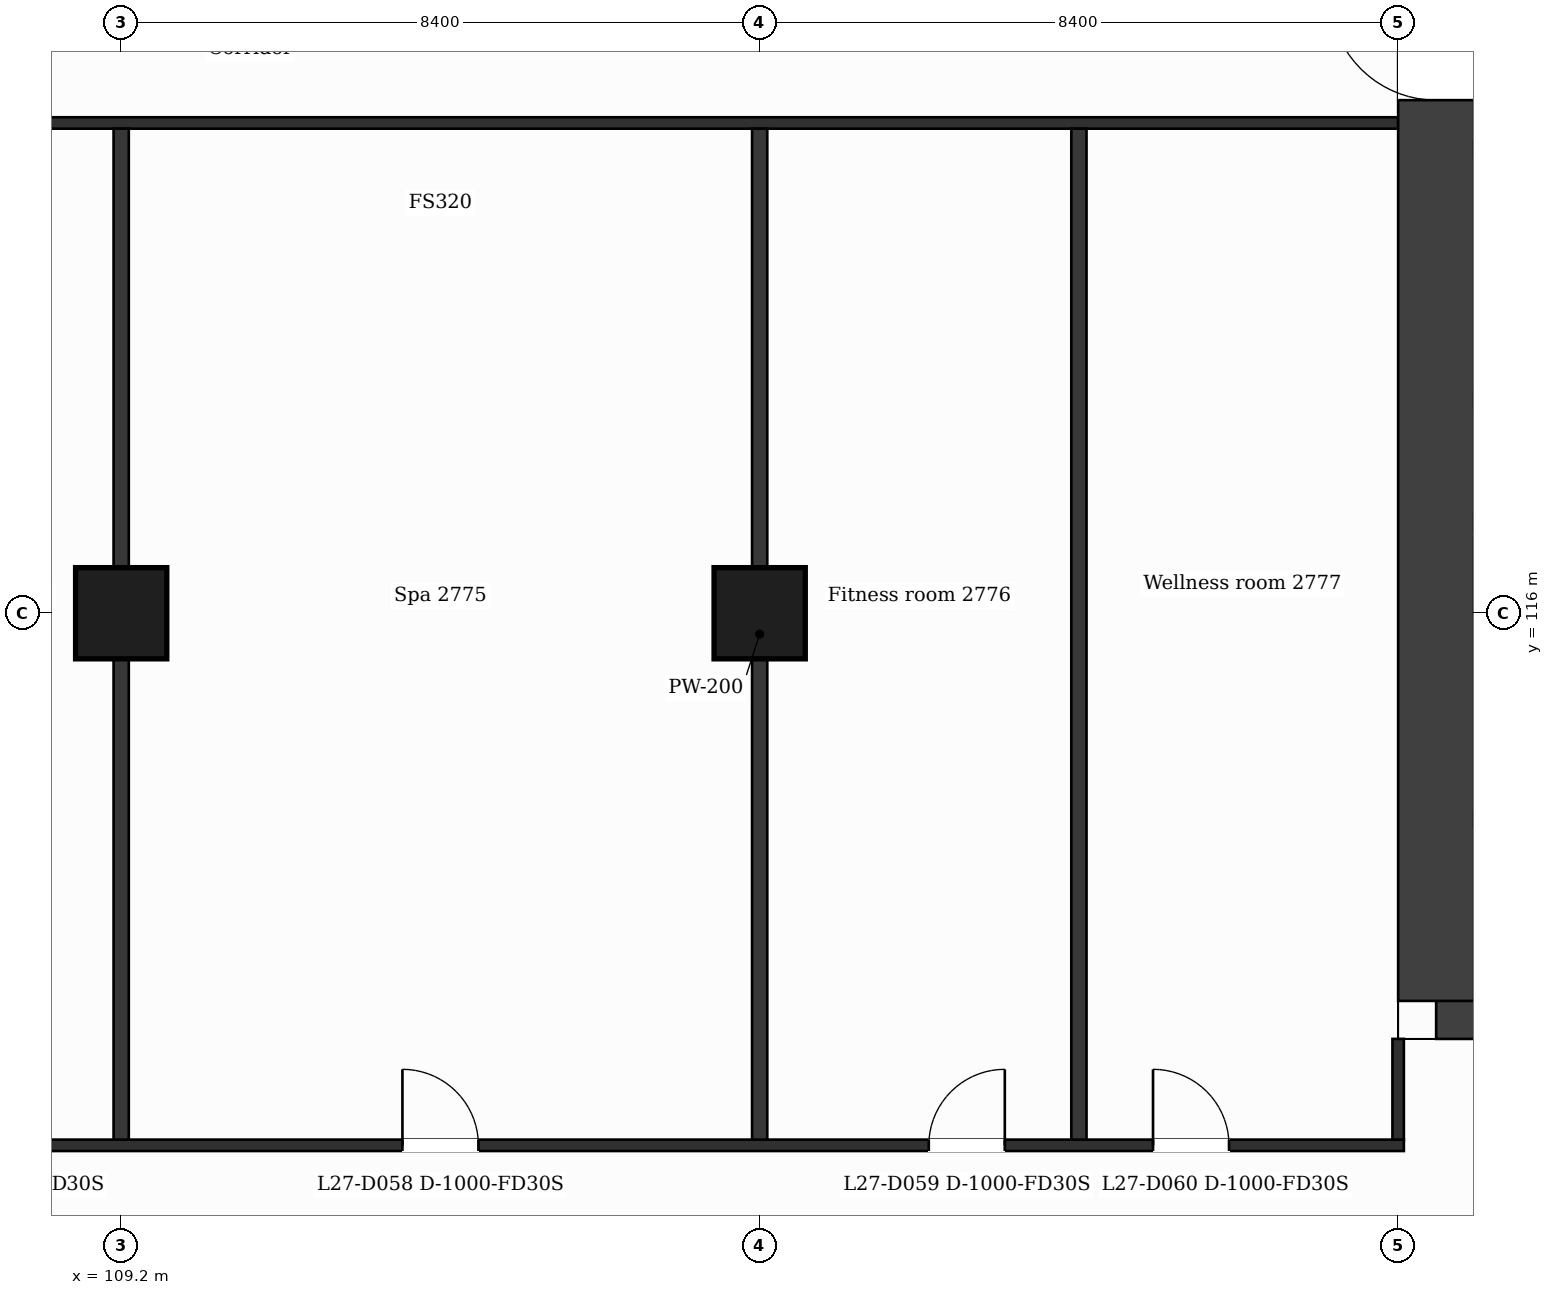
"""IFC4 building model, lengths in metres.
Left out: names, types, materials, properties, quantities, classifications, styles, units other than length and angle.
Written with IfcOpenShell. Run it as: python <this file> out.ifc"""

import sys

from ifc_helpers import new_model, si_unit, direction, frame, frame_2d, origin, origin_2d, place, context, subcontext, project, spatial, rectangle, extrude, element, fill, save


model = new_model("IFC4")
c1 = context("Model", 3, precision=1e-05, world=origin(), true_north=direction((0.0, 1.0)))
c2 = subcontext(c1, "Body", "Model", "MODEL_VIEW")
j1 = project(units=[si_unit("LENGTHUNIT", "METRE"), si_unit("PLANEANGLEUNIT", "RADIAN")], contexts=[c1])
p1 = place(None, origin())
s1 = spatial("IfcSite", under=j1, at=p1, CompositionType="ELEMENT")
p2 = place(p1, origin())
s2 = spatial("IfcBuilding", under=s1, at=p2, CompositionType="ELEMENT")
p3 = place(p2, frame((0.0, 0.0, 116.9)))
s3 = spatial("IfcBuildingStorey", under=s2, at=p3, CompositionType="ELEMENT", Elevation=116.9)
p4 = place(p3, frame((140.559, 110.9, 0.0), z_axis=(0.0, 0.0, 1.0), x_axis=(-1.0, 0.0, 0.0)))
e1 = element("IfcWall", 1, at=p4, inside=s3, PredefinedType="SHEAR", context=c2, shape_type="SweptSolid", body=[
    extrude(rectangle(XDim=14.059, YDim=1.0, at=frame_2d((7.029, 0.0))), origin(), (0.0, 0.0, 1.0), 3.7),
])
p5 = place(p4, frame((6.858, 0.0, 0.0)))
e2 = element("IfcOpeningElement", 2, at=p5, cuts=e1, PredefinedType="OPENING", context=c2, shape_type="SweptSolid", body=[
    extrude(rectangle(XDim=1.4, YDim=2.1, at=frame_2d((0.7, 1.05))), frame((0.0, 0.51, 0.0), z_axis=(0.0, -1.0, 0.0), x_axis=(1.0, 0.0, 0.0)), (0.0, 0.0, 1.0), 1.02),
])
p6 = place(p3, frame((126.5, 110.9, 0.0), z_axis=(0.0, 0.0, 1.0), x_axis=(0.0, 1.0, 0.0)))
e3 = element("IfcWall", 3, at=p6, inside=s3, PredefinedType="SHEAR", context=c2, shape_type="SweptSolid", body=[
    extrude(rectangle(XDim=21.0, YDim=1.0, at=frame_2d((10.5, 0.0))), origin(), (0.0, 0.0, 1.0), 3.7),
])
p7 = place(p6, frame((11.85, 0.0, 0.0)))
e4 = element("IfcOpeningElement", 4, at=p7, cuts=e3, PredefinedType="OPENING", context=c2, shape_type="SweptSolid", body=[
    extrude(rectangle(XDim=1.4, YDim=2.1, at=frame_2d((0.7, 1.05))), frame((0.0, 0.51, 0.0), z_axis=(0.0, -1.0, 0.0), x_axis=(1.0, 0.0, 0.0)), (0.0, 0.0, 1.0), 1.02),
])
for number, where, z_axis, x_axis in (
    (5, (109.2, 116.0, 0.0), (0.0, 0.0, 1.0), (1.0, 0.0, 0.0)),
    (6, (117.6, 116.0, 0.0), (0.0, 0.0, 1.0), (1.0, 0.0, 0.0)),
):
    element("IfcColumn", number, at=place(p3, frame(where, z_axis=z_axis, x_axis=x_axis)), inside=s3, PredefinedType="COLUMN", context=c2, shape_type="SweptSolid", body=[
        extrude(rectangle(XDim=1.2, YDim=1.2, at=origin_2d()), origin(), (0.0, 0.0, 1.0), 3.7),
    ])
p8 = place(p3, frame((100.725, 109.0, 0.0), z_axis=(0.0, 0.0, 1.0), x_axis=(1.0, 0.0, 0.0)))
e7 = element("IfcWall", 7, at=p8, inside=s3, PredefinedType="PARTITIONING", context=c2, shape_type="SweptSolid", body=[
    extrude(rectangle(XDim=25.35, YDim=0.15, at=frame_2d((12.675, 0.0))), origin(), (0.0, 0.0, 1.0), 3.38),
])
p9 = place(p8, frame((1.925, 0.0, 0.0)))
e8 = element("IfcOpeningElement", 8, at=p9, cuts=e7, PredefinedType="OPENING", context=c2, shape_type="SweptSolid", body=[
    extrude(rectangle(XDim=1.0, YDim=2.1, at=frame_2d((0.5, 1.05))), frame((0.0, 0.085, 0.0), z_axis=(0.0, -1.0, 0.0), x_axis=(1.0, 0.0, 0.0)), (0.0, 0.0, 1.0), 0.17),
])
p10 = place(p8, frame((6.125, 0.0, 0.0)))
e9 = element("IfcOpeningElement", 9, at=p10, cuts=e7, PredefinedType="OPENING", context=c2, shape_type="SweptSolid", body=[
    extrude(rectangle(XDim=1.0, YDim=2.1, at=frame_2d((0.5, 1.05))), frame((0.0, 0.085, 0.0), z_axis=(0.0, -1.0, 0.0), x_axis=(1.0, 0.0, 0.0)), (0.0, 0.0, 1.0), 0.17),
])
p11 = place(p8, frame((12.175, 0.0, 0.0)))
e10 = element("IfcOpeningElement", 10, at=p11, cuts=e7, PredefinedType="OPENING", context=c2, shape_type="SweptSolid", body=[
    extrude(rectangle(XDim=1.0, YDim=2.1, at=frame_2d((0.5, 1.05))), frame((0.0, 0.085, 0.0), z_axis=(0.0, -1.0, 0.0), x_axis=(1.0, 0.0, 0.0)), (0.0, 0.0, 1.0), 0.17),
])
p12 = place(p8, frame((19.1, 0.0, 0.0)))
e11 = element("IfcOpeningElement", 11, at=p12, cuts=e7, PredefinedType="OPENING", context=c2, shape_type="SweptSolid", body=[
    extrude(rectangle(XDim=1.0, YDim=2.1, at=frame_2d((0.5, 1.05))), frame((0.0, 0.085, 0.0), z_axis=(0.0, -1.0, 0.0), x_axis=(1.0, 0.0, 0.0)), (0.0, 0.0, 1.0), 0.17),
])
p13 = place(p8, frame((22.05, 0.0, 0.0)))
e12 = element("IfcOpeningElement", 12, at=p13, cuts=e7, PredefinedType="OPENING", context=c2, shape_type="SweptSolid", body=[
    extrude(rectangle(XDim=1.0, YDim=2.1, at=frame_2d((0.5, 1.05))), frame((0.0, 0.085, 0.0), z_axis=(0.0, -1.0, 0.0), x_axis=(1.0, 0.0, 0.0)), (0.0, 0.0, 1.0), 0.17),
])
p14 = place(p3, frame((127.0, 113.3, 0.0), z_axis=(0.0, 0.0, 1.0), x_axis=(1.0, 0.0, 0.0)))
e13 = element("IfcWall", 13, at=p14, inside=s3, PredefinedType="PARTITIONING", context=c2, shape_type="SweptSolid", body=[
    extrude(rectangle(XDim=4.673, YDim=0.2, at=frame_2d((2.336, 0.0))), origin(), (0.0, 0.0, 1.0), 3.38),
])
p15 = place(p14, frame((0.715, 0.0, 0.0)))
e14 = element("IfcOpeningElement", 14, at=p15, cuts=e13, PredefinedType="OPENING", context=c2, shape_type="SweptSolid", body=[
    extrude(rectangle(XDim=1.1, YDim=2.1, at=frame_2d((0.55, 1.05))), frame((0.0, 0.11, 0.0), z_axis=(0.0, -1.0, 0.0), x_axis=(1.0, 0.0, 0.0)), (0.0, 0.0, 1.0), 0.22),
])
p16 = place(p3, frame((100.8, 122.45, 0.0), z_axis=(0.0, 0.0, 1.0), x_axis=(1.0, 0.0, 0.0)))
e15 = element("IfcWall", 15, at=p16, inside=s3, PredefinedType="PARTITIONING", context=c2, shape_type="SweptSolid", body=[
    extrude(rectangle(XDim=25.2, YDim=0.15, at=frame_2d((12.6, 0.0))), origin(), (0.0, 0.0, 1.0), 3.38),
])
for number, where, z_axis, x_axis in (
    (16, (109.2, 109.075, 0.0), (0.0, 0.0, 1.0), (0.0, 1.0, 0.0)),
    (17, (117.6, 109.075, 0.0), (0.0, 0.0, 1.0), (0.0, 1.0, 0.0)),
    (18, (121.8, 109.075, 0.0), (0.0, 0.0, 1.0), (0.0, 1.0, 0.0)),
):
    element("IfcWall", number, at=place(p3, frame(where, z_axis=z_axis, x_axis=x_axis)), inside=s3, PredefinedType="PARTITIONING", context=c2, shape_type="SweptSolid", body=[
        extrude(rectangle(XDim=13.3, YDim=0.2, at=frame_2d((6.65, 0.0))), origin(), (0.0, 0.0, 1.0), 3.38),
    ])
p17 = place(p3, frame((126.0, 109.075, 0.0), z_axis=(0.0, 0.0, 1.0), x_axis=(0.0, 1.0, 0.0)))
e19 = element("IfcWall", 19, at=p17, inside=s3, PredefinedType="PARTITIONING", context=c2, shape_type="SweptSolid", body=[
    extrude(rectangle(XDim=1.325, YDim=0.15, at=frame_2d((0.663, 0.0))), origin(), (0.0, 0.0, 1.0), 3.38),
])
p18 = place(p11, origin())
e20 = element("IfcDoor", 20, at=p18, inside=s3, OperationType="SINGLE_SWING_LEFT", PredefinedType="DOOR", context=c2, shape_type="SweptSolid", body=[
    extrude(rectangle(XDim=1.0, YDim=2.1, at=frame_2d((0.5, 1.05))), frame((0.0, 0.025, 0.0), z_axis=(0.0, -1.0, 0.0), x_axis=(1.0, 0.0, 0.0)), (0.0, 0.0, 1.0), 0.05),
])
fill(e10, e20)
p19 = place(p12, origin())
e21 = element("IfcDoor", 21, at=p19, inside=s3, OperationType="SINGLE_SWING_RIGHT", PredefinedType="DOOR", context=c2, shape_type="SweptSolid", body=[
    extrude(rectangle(XDim=1.0, YDim=2.1, at=frame_2d((0.5, 1.05))), frame((0.0, 0.025, 0.0), z_axis=(0.0, -1.0, 0.0), x_axis=(1.0, 0.0, 0.0)), (0.0, 0.0, 1.0), 0.05),
])
fill(e11, e21)
p20 = place(p13, origin())
e22 = element("IfcDoor", 22, at=p20, inside=s3, OperationType="SINGLE_SWING_LEFT", PredefinedType="DOOR", context=c2, shape_type="SweptSolid", body=[
    extrude(rectangle(XDim=1.0, YDim=2.1, at=frame_2d((0.5, 1.05))), frame((0.0, 0.025, 0.0), z_axis=(0.0, -1.0, 0.0), x_axis=(1.0, 0.0, 0.0)), (0.0, 0.0, 1.0), 0.05),
])
fill(e12, e22)
p21 = place(p7, origin())
e23 = element("IfcDoor", 23, at=p21, inside=s3, OperationType="SINGLE_SWING_RIGHT", PredefinedType="DOOR", context=c2, shape_type="SweptSolid", body=[
    extrude(rectangle(XDim=1.4, YDim=2.1, at=frame_2d((0.7, 1.05))), frame((0.0, 0.025, 0.0), z_axis=(0.0, -1.0, 0.0), x_axis=(1.0, 0.0, 0.0)), (0.0, 0.0, 1.0), 0.05),
])
fill(e4, e23)
save(model, sys.argv[1])
